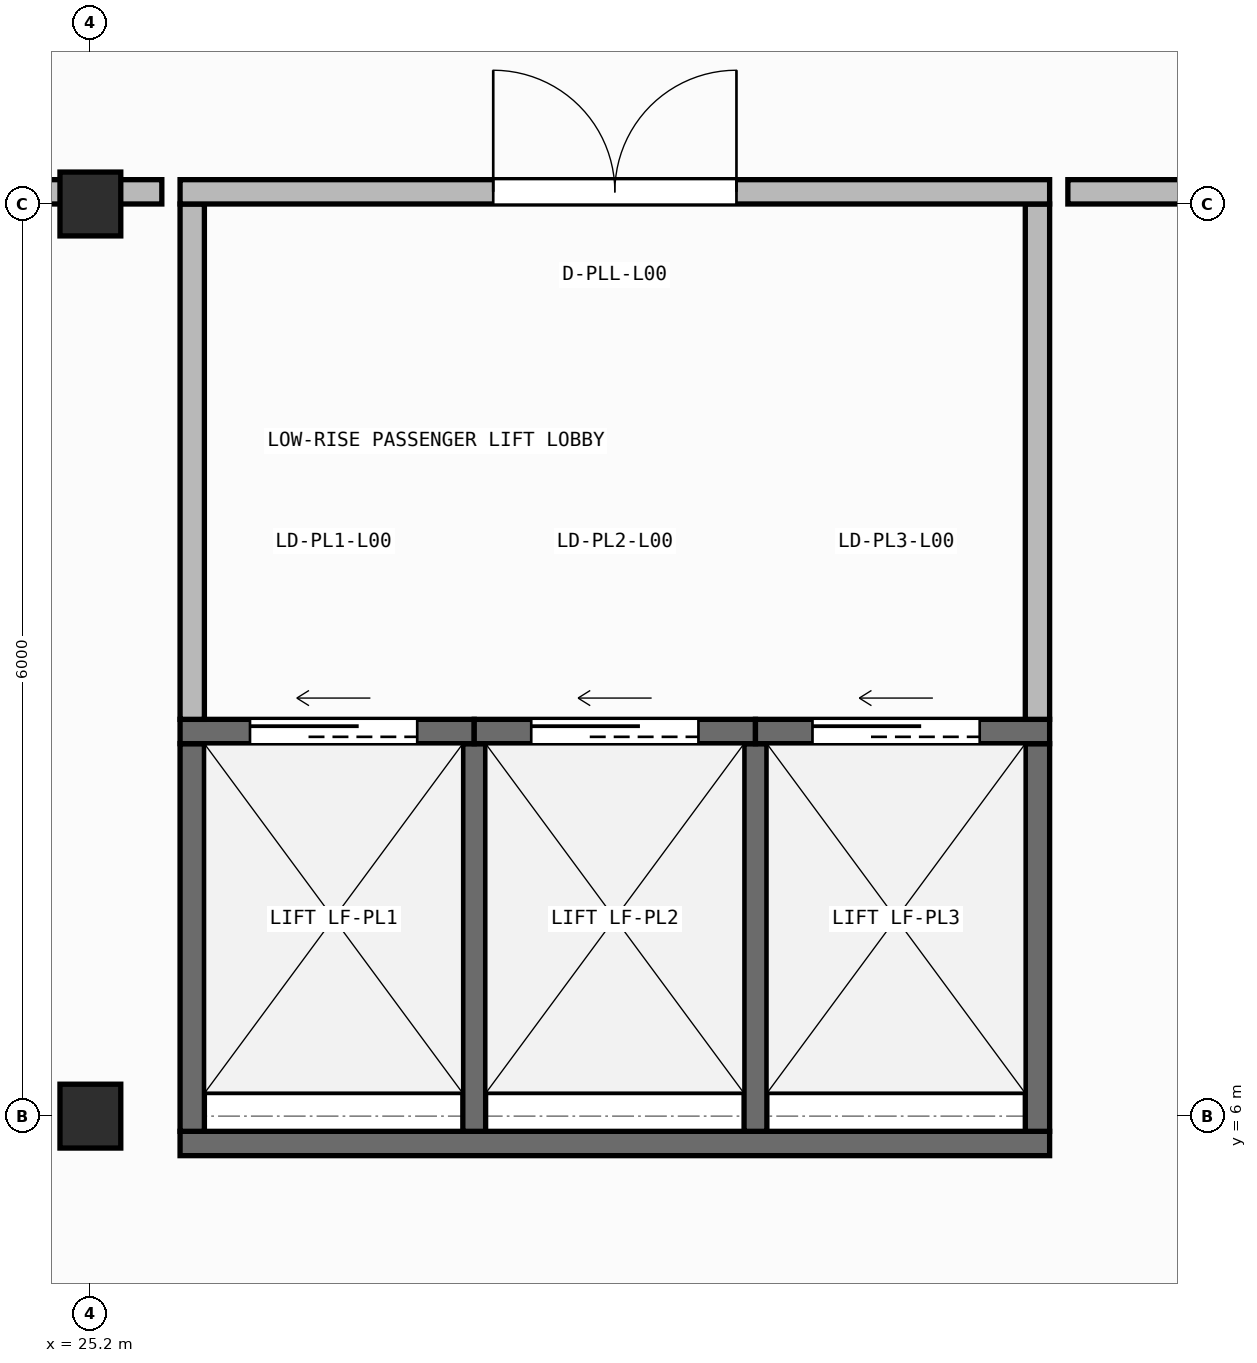
"""IFC4 building model, lengths in metres.
Left out: names, types, materials, properties, quantities, classifications, styles, units other than length and angle.
Written with IfcOpenShell. Run it as: python <this file> out.ifc"""

import sys

from ifc_helpers import new_model, si_unit, direction, frame, frame_2d, origin, origin_2d, place, context, subcontext, project, spatial, rectangle, i_section, extrude, element, fill, save


model = new_model("IFC4")
c1 = context("Model", 3, precision=1e-05, world=origin(), true_north=direction((0.0, 1.0)))
c2 = subcontext(c1, "Body", "Model", "MODEL_VIEW")
j1 = project(units=[si_unit("LENGTHUNIT", "METRE"), si_unit("PLANEANGLEUNIT", "RADIAN")], contexts=[c1])
p1 = place(None, origin())
s1 = spatial("IfcSite", under=j1, at=p1, CompositionType="ELEMENT")
p2 = place(p1, origin())
s2 = spatial("IfcBuilding", under=s1, at=p2, CompositionType="ELEMENT")
p3 = place(p2, origin())
s3 = spatial("IfcBuildingStorey", under=s2, at=p3, CompositionType="ELEMENT", Elevation=0.0)
for number, where, z_axis, x_axis in (
    (1, (25.2, 6.0, 0.0), (0.0, 0.0, 1.0), (1.0, 0.0, 0.0)),
    (2, (25.2, 12.0, 0.0), (0.0, 0.0, 1.0), (1.0, 0.0, 0.0)),
):
    element("IfcColumn", number, at=place(p3, frame(where, z_axis=z_axis, x_axis=x_axis)), inside=s3, PredefinedType="COLUMN", context=c2, shape_type="SweptSolid", body=[
        extrude(i_section(OverallWidth=0.4, OverallDepth=0.42, WebThickness=0.025, FlangeThickness=0.04, at=origin_2d()), origin(), (0.0, 0.0, 1.0), 4.5),
    ])
p4 = place(p3, frame((25.79, 5.82, 0.0), z_axis=(0.0, 0.0, 1.0), x_axis=(1.0, 0.0, 0.0)))
e3 = element("IfcWall", 3, at=p4, inside=s3, PredefinedType="SHEAR", context=c2, shape_type="SweptSolid", body=[
    extrude(rectangle(XDim=5.72, YDim=0.16, at=frame_2d((2.86, 0.0))), origin(), (0.0, 0.0, 1.0), 4.25),
])
for number, where, z_axis, x_axis in (
    (4, (25.87, 5.9, 0.0), (0.0, 0.0, 1.0), (0.0, 1.0, 0.0)),
    (5, (31.43, 5.9, 0.0), (0.0, 0.0, 1.0), (0.0, 1.0, 0.0)),
):
    element("IfcWall", number, at=place(p3, frame(where, z_axis=z_axis, x_axis=x_axis)), inside=s3, PredefinedType="SHEAR", context=c2, shape_type="SweptSolid", body=[
        extrude(rectangle(XDim=2.55, YDim=0.16, at=frame_2d((1.275, 0.0))), origin(), (0.0, 0.0, 1.0), 4.25),
    ])
for number, where, z_axis, x_axis in (
    (6, (27.725, 5.9, 0.0), (0.0, 0.0, 1.0), (0.0, 1.0, 0.0)),
    (7, (29.575, 5.9, 0.0), (0.0, 0.0, 1.0), (0.0, 1.0, 0.0)),
):
    element("IfcWall", number, at=place(p3, frame(where, z_axis=z_axis, x_axis=x_axis)), inside=s3, PredefinedType="SHEAR", context=c2, shape_type="SweptSolid", body=[
        extrude(rectangle(XDim=2.55, YDim=0.15, at=frame_2d((1.275, 0.0))), origin(), (0.0, 0.0, 1.0), 4.25),
    ])
p5 = place(p3, frame((25.79, 8.53, 0.0), z_axis=(0.0, 0.0, 1.0), x_axis=(1.0, 0.0, 0.0)))
e8 = element("IfcWall", 8, at=p5, inside=s3, PredefinedType="SHEAR", context=c2, shape_type="SweptSolid", body=[
    extrude(rectangle(XDim=1.935, YDim=0.16, at=frame_2d((0.968, 0.0))), origin(), (0.0, 0.0, 1.0), 4.25),
])
p6 = place(p5, frame((0.46, 0.0, 0.0)))
e9 = element("IfcOpeningElement", 9, at=p6, cuts=e8, PredefinedType="OPENING", context=c2, shape_type="SweptSolid", body=[
    extrude(rectangle(XDim=1.1, YDim=2.15, at=frame_2d((0.55, 1.075))), frame((0.0, 0.09, 0.0), z_axis=(0.0, -1.0, 0.0), x_axis=(1.0, 0.0, 0.0)), (0.0, 0.0, 1.0), 0.18),
])
p7 = place(p3, frame((27.725, 8.53, 0.0), z_axis=(0.0, 0.0, 1.0), x_axis=(1.0, 0.0, 0.0)))
e10 = element("IfcWall", 10, at=p7, inside=s3, PredefinedType="SHEAR", context=c2, shape_type="SweptSolid", body=[
    extrude(rectangle(XDim=1.85, YDim=0.16, at=frame_2d((0.925, 0.0))), origin(), (0.0, 0.0, 1.0), 4.25),
])
p8 = place(p7, frame((0.375, 0.0, 0.0)))
e11 = element("IfcOpeningElement", 11, at=p8, cuts=e10, PredefinedType="OPENING", context=c2, shape_type="SweptSolid", body=[
    extrude(rectangle(XDim=1.1, YDim=2.15, at=frame_2d((0.55, 1.075))), frame((0.0, 0.09, 0.0), z_axis=(0.0, -1.0, 0.0), x_axis=(1.0, 0.0, 0.0)), (0.0, 0.0, 1.0), 0.18),
])
p9 = place(p3, frame((29.575, 8.53, 0.0), z_axis=(0.0, 0.0, 1.0), x_axis=(1.0, 0.0, 0.0)))
e12 = element("IfcWall", 12, at=p9, inside=s3, PredefinedType="SHEAR", context=c2, shape_type="SweptSolid", body=[
    extrude(rectangle(XDim=1.935, YDim=0.16, at=frame_2d((0.968, 0.0))), origin(), (0.0, 0.0, 1.0), 4.25),
])
p10 = place(p9, frame((0.375, 0.0, 0.0)))
e13 = element("IfcOpeningElement", 13, at=p10, cuts=e12, PredefinedType="OPENING", context=c2, shape_type="SweptSolid", body=[
    extrude(rectangle(XDim=1.1, YDim=2.15, at=frame_2d((0.55, 1.075))), frame((0.0, 0.09, 0.0), z_axis=(0.0, -1.0, 0.0), x_axis=(1.0, 0.0, 0.0)), (0.0, 0.0, 1.0), 0.18),
])
for number, where, z_axis, x_axis in (
    (14, (25.87, 8.61, 0.0), (0.0, 0.0, 1.0), (0.0, 1.0, 0.0)),
    (15, (31.43, 8.61, 0.0), (0.0, 0.0, 1.0), (0.0, 1.0, 0.0)),
):
    element("IfcWall", number, at=place(p3, frame(where, z_axis=z_axis, x_axis=x_axis)), inside=s3, PredefinedType="PARTITIONING", context=c2, shape_type="SweptSolid", body=[
        extrude(rectangle(XDim=3.39, YDim=0.16, at=frame_2d((1.695, 0.0))), origin(), (0.0, 0.0, 1.0), 4.25),
    ])
p11 = place(p3, frame((25.79, 12.08, 0.0), z_axis=(0.0, 0.0, 1.0), x_axis=(1.0, 0.0, 0.0)))
e16 = element("IfcWall", 16, at=p11, inside=s3, PredefinedType="PARTITIONING", context=c2, shape_type="SweptSolid", body=[
    extrude(rectangle(XDim=5.72, YDim=0.16, at=frame_2d((2.86, 0.0))), origin(), (0.0, 0.0, 1.0), 3.425),
])
p12 = place(p11, frame((2.06, 0.0, 0.0)))
e17 = element("IfcOpeningElement", 17, at=p12, cuts=e16, PredefinedType="OPENING", context=c2, shape_type="SweptSolid", body=[
    extrude(rectangle(XDim=1.6, YDim=2.05, at=frame_2d((0.8, 1.025))), frame((0.0, 0.09, 0.0), z_axis=(0.0, -1.0, 0.0), x_axis=(1.0, 0.0, 0.0)), (0.0, 0.0, 1.0), 0.18),
])
p13 = place(p3, frame((24.02, 12.08, 0.0), z_axis=(0.0, 0.0, 1.0), x_axis=(1.0, 0.0, 0.0)))
e18 = element("IfcWall", 18, at=p13, inside=s3, PredefinedType="PARTITIONING", context=c2, shape_type="SweptSolid", body=[
    extrude(rectangle(XDim=1.65, YDim=0.16, at=frame_2d((0.825, 0.0))), origin(), (0.0, 0.0, 1.0), 3.425),
])
p14 = place(p3, frame((31.63, 12.08, 0.0), z_axis=(0.0, 0.0, 1.0), x_axis=(1.0, 0.0, 0.0)))
e19 = element("IfcWall", 19, at=p14, inside=s3, PredefinedType="PARTITIONING", context=c2, shape_type="SweptSolid", body=[
    extrude(rectangle(XDim=2.44, YDim=0.16, at=frame_2d((1.22, 0.0))), origin(), (0.0, 0.0, 1.0), 3.425),
])
p15 = place(p6, origin())
e20 = element("IfcDoor", 20, at=p15, inside=s3, OperationType="SLIDING_TO_LEFT", PredefinedType="DOOR", context=c2, shape_type="SweptSolid", body=[
    extrude(rectangle(XDim=1.1, YDim=2.15, at=frame_2d((0.55, 1.075))), frame((0.0, 0.025, 0.0), z_axis=(0.0, -1.0, 0.0), x_axis=(1.0, 0.0, 0.0)), (0.0, 0.0, 1.0), 0.05),
])
fill(e9, e20)
p16 = place(p8, origin())
e21 = element("IfcDoor", 21, at=p16, inside=s3, OperationType="SLIDING_TO_LEFT", PredefinedType="DOOR", context=c2, shape_type="SweptSolid", body=[
    extrude(rectangle(XDim=1.1, YDim=2.15, at=frame_2d((0.55, 1.075))), frame((0.0, 0.025, 0.0), z_axis=(0.0, -1.0, 0.0), x_axis=(1.0, 0.0, 0.0)), (0.0, 0.0, 1.0), 0.05),
])
fill(e11, e21)
p17 = place(p10, origin())
e22 = element("IfcDoor", 22, at=p17, inside=s3, OperationType="SLIDING_TO_LEFT", PredefinedType="DOOR", context=c2, shape_type="SweptSolid", body=[
    extrude(rectangle(XDim=1.1, YDim=2.15, at=frame_2d((0.55, 1.075))), frame((0.0, 0.025, 0.0), z_axis=(0.0, -1.0, 0.0), x_axis=(1.0, 0.0, 0.0)), (0.0, 0.0, 1.0), 0.05),
])
fill(e13, e22)
p18 = place(p12, origin())
e23 = element("IfcDoor", 23, at=p18, inside=s3, OperationType="DOUBLE_DOOR_SINGLE_SWING", PredefinedType="DOOR", context=c2, shape_type="SweptSolid", body=[
    extrude(rectangle(XDim=1.6, YDim=2.05, at=frame_2d((0.8, 1.025))), frame((0.0, 0.025, 0.0), z_axis=(0.0, -1.0, 0.0), x_axis=(1.0, 0.0, 0.0)), (0.0, 0.0, 1.0), 0.05),
])
fill(e17, e23)
save(model, sys.argv[1])
